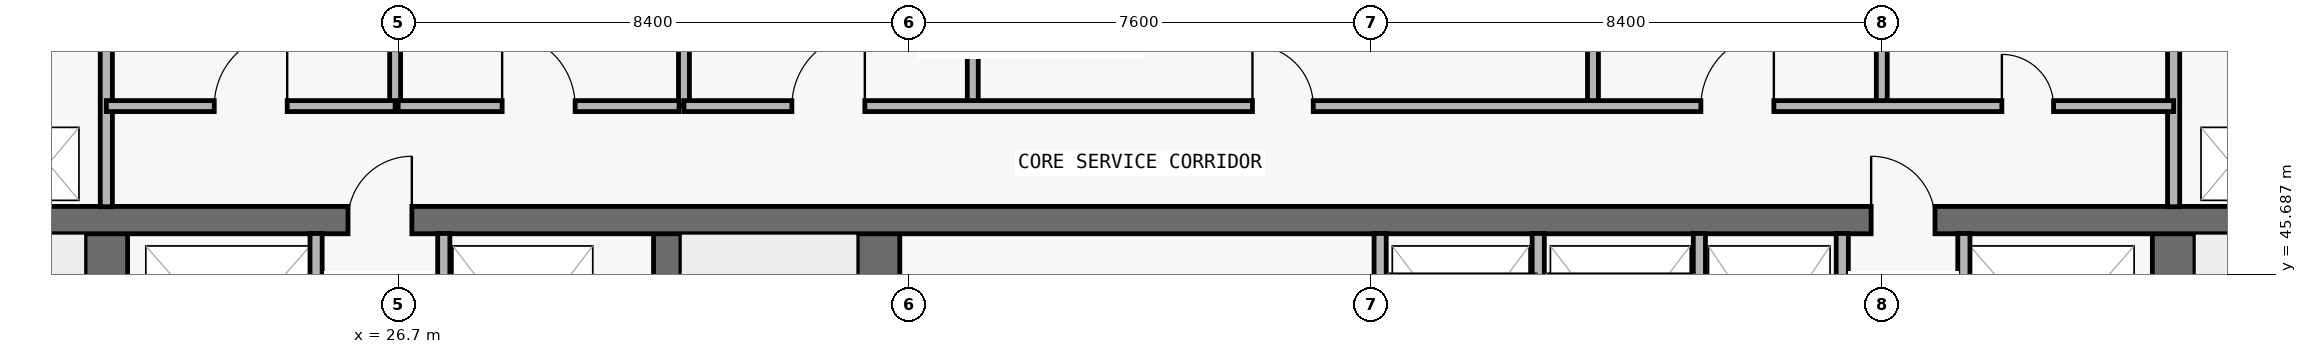
"""IFC4 building model, lengths in metres.
Left out: names, types, materials, properties, quantities, classifications, styles, units other than length and angle.
Written with IfcOpenShell. Run it as: python <this file> out.ifc"""

import sys

from ifc_helpers import new_model, si_unit, direction, frame, frame_2d, origin, place, context, subcontext, project, spatial, rectangle, extrude, element, fill, save


model = new_model("IFC4")
c1 = context("Model", 3, precision=1e-05, world=origin(), true_north=direction((0.0, 1.0)))
c2 = subcontext(c1, "Body", "Model", "MODEL_VIEW")
j1 = project(units=[si_unit("LENGTHUNIT", "METRE"), si_unit("PLANEANGLEUNIT", "RADIAN")], contexts=[c1])
p1 = place(None, origin())
s1 = spatial("IfcSite", under=j1, at=p1, CompositionType="ELEMENT")
p2 = place(p1, origin())
s2 = spatial("IfcBuilding", under=s1, at=p2, CompositionType="ELEMENT")
p3 = place(p2, frame((0.0, 0.0, 170.4)))
s3 = spatial("IfcBuildingStorey", under=s2, at=p3, CompositionType="ELEMENT", Elevation=170.4)
p4 = place(p3, frame((21.9, 37.0, 0.0), z_axis=(0.0, 0.0, 1.0), x_axis=(0.0, 1.0, 0.0)))
e1 = element("IfcWall", 1, at=p4, inside=s3, PredefinedType="SHEAR", context=c2, shape_type="SweptSolid", body=[
    extrude(rectangle(XDim=9.575, YDim=0.7, at=frame_2d((4.788, 0.0))), origin(), (0.0, 0.0, 1.0), 3.05),
])
p5 = place(p4, frame((0.55, 0.0, 0.0)))
e2 = element("IfcOpeningElement", 2, at=p5, cuts=e1, PredefinedType="OPENING", context=c2, shape_type="SweptSolid", body=[
    extrude(rectangle(XDim=1.1, YDim=2.15, at=frame_2d((0.55, 1.075))), frame((0.0, 0.36, 0.0), z_axis=(0.0, -1.0, 0.0), x_axis=(1.0, 0.0, 0.0)), (0.0, 0.0, 1.0), 0.72),
])
p6 = place(p3, frame((55.9, 37.0, 0.0), z_axis=(0.0, 0.0, 1.0), x_axis=(0.0, 1.0, 0.0)))
e3 = element("IfcWall", 3, at=p6, inside=s3, PredefinedType="SHEAR", context=c2, shape_type="SweptSolid", body=[
    extrude(rectangle(XDim=9.575, YDim=0.7, at=frame_2d((4.788, 0.0))), origin(), (0.0, 0.0, 1.0), 3.05),
])
p7 = place(p6, frame((0.55, 0.0, 0.0)))
e4 = element("IfcOpeningElement", 4, at=p7, cuts=e3, PredefinedType="OPENING", context=c2, shape_type="SweptSolid", body=[
    extrude(rectangle(XDim=1.1, YDim=2.15, at=frame_2d((0.55, 1.075))), frame((0.0, 0.36, 0.0), z_axis=(0.0, -1.0, 0.0), x_axis=(1.0, 0.0, 0.0)), (0.0, 0.0, 1.0), 0.72),
])
p8 = place(p3, frame((31.125, 37.0, 0.0), z_axis=(0.0, 0.0, 1.0), x_axis=(0.0, 1.0, 0.0)))
e5 = element("IfcWall", 5, at=p8, inside=s3, PredefinedType="SHEAR", context=c2, shape_type="SweptSolid", body=[
    extrude(rectangle(XDim=9.575, YDim=0.45, at=frame_2d((4.788, 0.0))), origin(), (0.0, 0.0, 1.0), 3.05),
])
p9 = place(p3, frame((34.6, 37.0, 0.0), z_axis=(0.0, 0.0, 1.0), x_axis=(0.0, 1.0, 0.0)))
e6 = element("IfcWall", 6, at=p9, inside=s3, PredefinedType="SHEAR", context=c2, shape_type="SweptSolid", body=[
    extrude(rectangle(XDim=9.575, YDim=0.7, at=frame_2d((4.788, 0.0))), origin(), (0.0, 0.0, 1.0), 3.05),
])
p10 = place(p3, frame((18.3, 46.575, 0.0), z_axis=(0.0, 0.0, 1.0), x_axis=(1.0, 0.0, 0.0)))
e7 = element("IfcWall", 7, at=p10, inside=s3, PredefinedType="SHEAR", context=c2, shape_type="SweptSolid", body=[
    extrude(rectangle(XDim=41.2, YDim=0.45, at=frame_2d((20.6, 0.0))), origin(), (0.0, 0.0, 1.0), 3.05),
])
p11 = place(p10, frame((7.575, 0.0, 0.0)))
e8 = element("IfcOpeningElement", 8, at=p11, cuts=e7, PredefinedType="OPENING", context=c2, shape_type="SweptSolid", body=[
    extrude(rectangle(XDim=1.05, YDim=2.15, at=frame_2d((0.525, 1.075))), frame((0.0, 0.235, 0.0), z_axis=(0.0, -1.0, 0.0), x_axis=(1.0, 0.0, 0.0)), (0.0, 0.0, 1.0), 0.47),
])
p12 = place(p10, frame((32.625, 0.0, 0.0)))
e9 = element("IfcOpeningElement", 9, at=p12, cuts=e7, PredefinedType="OPENING", context=c2, shape_type="SweptSolid", body=[
    extrude(rectangle(XDim=1.05, YDim=2.15, at=frame_2d((0.525, 1.075))), frame((0.0, 0.235, 0.0), z_axis=(0.0, -1.0, 0.0), x_axis=(1.0, 0.0, 0.0)), (0.0, 0.0, 1.0), 0.47),
])
p13 = place(p3, frame((21.9, 46.795, 0.0), z_axis=(0.0, 0.0, 1.0), x_axis=(0.0, 1.0, 0.0)))
e10 = element("IfcWall", 10, at=p13, inside=s3, PredefinedType="PARTITIONING", context=c2, shape_type="SweptSolid", body=[
    extrude(rectangle(XDim=3.16, YDim=0.2, at=frame_2d((1.58, 0.0))), origin(), (0.0, 0.0, 1.0), 3.05),
])
p14 = place(p3, frame((25.35, 43.17, 0.0), z_axis=(0.0, 0.0, 1.0), x_axis=(0.0, 1.0, 0.0)))
e11 = element("IfcWall", 11, at=p14, inside=s3, PredefinedType="PARTITIONING", context=c2, shape_type="SweptSolid", body=[
    extrude(rectangle(XDim=3.185, YDim=0.2, at=frame_2d((1.593, 0.0))), origin(), (0.0, 0.0, 1.0), 3.05),
])
p15 = place(p3, frame((26.65, 48.45, 0.0), z_axis=(0.0, 0.0, 1.0), x_axis=(0.0, 1.0, 0.0)))
e12 = element("IfcWall", 12, at=p15, inside=s3, PredefinedType="PARTITIONING", context=c2, shape_type="SweptSolid", body=[
    extrude(rectangle(XDim=1.505, YDim=0.18, at=frame_2d((0.752, 0.0))), origin(), (0.0, 0.0, 1.0), 3.05),
])
p16 = place(p3, frame((27.45, 43.17, 0.0), z_axis=(0.0, 0.0, 1.0), x_axis=(0.0, 1.0, 0.0)))
e13 = element("IfcWall", 13, at=p16, inside=s3, PredefinedType="PARTITIONING", context=c2, shape_type="SweptSolid", body=[
    extrude(rectangle(XDim=3.185, YDim=0.2, at=frame_2d((1.593, 0.0))), origin(), (0.0, 0.0, 1.0), 3.05),
])
for number, where, z_axis, x_axis in (
    (14, (31.4, 48.45, 0.0), (0.0, 0.0, 1.0), (0.0, 1.0, 0.0)),
    (15, (36.15, 48.45, 0.0), (0.0, 0.0, 1.0), (0.0, 1.0, 0.0)),
):
    element("IfcWall", number, at=place(p3, frame(where, z_axis=z_axis, x_axis=x_axis)), inside=s3, PredefinedType="PARTITIONING", context=c2, shape_type="SweptSolid", body=[
        extrude(rectangle(XDim=1.505, YDim=0.18, at=frame_2d((0.752, 0.0))), origin(), (0.0, 0.0, 1.0), 3.05),
    ])
for number, where, z_axis, x_axis in (
    (16, (42.85, 43.17, 0.0), (0.0, 0.0, 1.0), (0.0, 1.0, 0.0)),
    (17, (45.45, 43.17, 0.0), (0.0, 0.0, 1.0), (0.0, 1.0, 0.0)),
):
    element("IfcWall", number, at=place(p3, frame(where, z_axis=z_axis, x_axis=x_axis)), inside=s3, PredefinedType="PARTITIONING", context=c2, shape_type="SweptSolid", body=[
        extrude(rectangle(XDim=3.185, YDim=0.2, at=frame_2d((1.593, 0.0))), origin(), (0.0, 0.0, 1.0), 3.05),
    ])
p17 = place(p3, frame((46.35, 48.45, 0.0), z_axis=(0.0, 0.0, 1.0), x_axis=(0.0, 1.0, 0.0)))
e18 = element("IfcWall", 18, at=p17, inside=s3, PredefinedType="PARTITIONING", context=c2, shape_type="SweptSolid", body=[
    extrude(rectangle(XDim=1.505, YDim=0.18, at=frame_2d((0.752, 0.0))), origin(), (0.0, 0.0, 1.0), 3.05),
])
for number, where, z_axis, x_axis in (
    (19, (48.1, 43.17, 0.0), (0.0, 0.0, 1.0), (0.0, 1.0, 0.0)),
    (20, (50.45, 43.17, 0.0), (0.0, 0.0, 1.0), (0.0, 1.0, 0.0)),
):
    element("IfcWall", number, at=place(p3, frame(where, z_axis=z_axis, x_axis=x_axis)), inside=s3, PredefinedType="PARTITIONING", context=c2, shape_type="SweptSolid", body=[
        extrude(rectangle(XDim=3.185, YDim=0.2, at=frame_2d((1.593, 0.0))), origin(), (0.0, 0.0, 1.0), 3.05),
    ])
p18 = place(p3, frame((51.1, 48.45, 0.0), z_axis=(0.0, 0.0, 1.0), x_axis=(0.0, 1.0, 0.0)))
e21 = element("IfcWall", 21, at=p18, inside=s3, PredefinedType="PARTITIONING", context=c2, shape_type="SweptSolid", body=[
    extrude(rectangle(XDim=1.505, YDim=0.18, at=frame_2d((0.752, 0.0))), origin(), (0.0, 0.0, 1.0), 3.05),
])
p19 = place(p3, frame((52.45, 43.17, 0.0), z_axis=(0.0, 0.0, 1.0), x_axis=(0.0, 1.0, 0.0)))
e22 = element("IfcWall", 22, at=p19, inside=s3, PredefinedType="PARTITIONING", context=c2, shape_type="SweptSolid", body=[
    extrude(rectangle(XDim=3.185, YDim=0.2, at=frame_2d((1.593, 0.0))), origin(), (0.0, 0.0, 1.0), 3.05),
])
p20 = place(p3, frame((55.9, 46.795, 0.0), z_axis=(0.0, 0.0, 1.0), x_axis=(0.0, 1.0, 0.0)))
e23 = element("IfcWall", 23, at=p20, inside=s3, PredefinedType="PARTITIONING", context=c2, shape_type="SweptSolid", body=[
    extrude(rectangle(XDim=3.16, YDim=0.2, at=frame_2d((1.58, 0.0))), origin(), (0.0, 0.0, 1.0), 3.05),
])
p21 = place(p3, frame((21.9, 48.45, 0.0), z_axis=(0.0, 0.0, 1.0), x_axis=(1.0, 0.0, 0.0)))
e24 = element("IfcWall", 24, at=p21, inside=s3, PredefinedType="PARTITIONING", context=c2, shape_type="SweptSolid", body=[
    extrude(rectangle(XDim=4.75, YDim=0.18, at=frame_2d((2.375, 0.0))), origin(), (0.0, 0.0, 1.0), 3.05),
])
p22 = place(p21, frame((1.775, 0.0, 0.0)))
e25 = element("IfcOpeningElement", 25, at=p22, cuts=e24, PredefinedType="OPENING", context=c2, shape_type="SweptSolid", body=[
    extrude(rectangle(XDim=1.2, YDim=2.2, at=frame_2d((0.6, 1.1))), frame((0.0, 0.1, 0.0), z_axis=(0.0, -1.0, 0.0), x_axis=(1.0, 0.0, 0.0)), (0.0, 0.0, 1.0), 0.2),
])
p23 = place(p3, frame((26.7, 48.45, 0.0), z_axis=(0.0, 0.0, 1.0), x_axis=(1.0, 0.0, 0.0)))
e26 = element("IfcWall", 26, at=p23, inside=s3, PredefinedType="PARTITIONING", context=c2, shape_type="SweptSolid", body=[
    extrude(rectangle(XDim=4.62, YDim=0.18, at=frame_2d((2.31, 0.0))), origin(), (0.0, 0.0, 1.0), 3.05),
])
p24 = place(p23, frame((1.71, 0.0, 0.0)))
e27 = element("IfcOpeningElement", 27, at=p24, cuts=e26, PredefinedType="OPENING", context=c2, shape_type="SweptSolid", body=[
    extrude(rectangle(XDim=1.2, YDim=2.2, at=frame_2d((0.6, 1.1))), frame((0.0, 0.1, 0.0), z_axis=(0.0, -1.0, 0.0), x_axis=(1.0, 0.0, 0.0)), (0.0, 0.0, 1.0), 0.2),
])
p25 = place(p3, frame((31.4, 48.45, 0.0), z_axis=(0.0, 0.0, 1.0), x_axis=(1.0, 0.0, 0.0)))
e28 = element("IfcWall", 28, at=p25, inside=s3, PredefinedType="PARTITIONING", context=c2, shape_type="SweptSolid", body=[
    extrude(rectangle(XDim=24.5, YDim=0.18, at=frame_2d((12.25, 0.0))), origin(), (0.0, 0.0, 1.0), 3.05),
])
p26 = place(p25, frame((1.775, 0.0, 0.0)))
e29 = element("IfcOpeningElement", 29, at=p26, cuts=e28, PredefinedType="OPENING", context=c2, shape_type="SweptSolid", body=[
    extrude(rectangle(XDim=1.2, YDim=2.2, at=frame_2d((0.6, 1.1))), frame((0.0, 0.1, 0.0), z_axis=(0.0, -1.0, 0.0), x_axis=(1.0, 0.0, 0.0)), (0.0, 0.0, 1.0), 0.2),
])
p27 = place(p25, frame((9.35, 0.0, 0.0)))
e30 = element("IfcOpeningElement", 30, at=p27, cuts=e28, PredefinedType="OPENING", context=c2, shape_type="SweptSolid", body=[
    extrude(rectangle(XDim=1.0, YDim=2.2, at=frame_2d((0.5, 1.1))), frame((0.0, 0.1, 0.0), z_axis=(0.0, -1.0, 0.0), x_axis=(1.0, 0.0, 0.0)), (0.0, 0.0, 1.0), 0.2),
])
p28 = place(p25, frame((16.725, 0.0, 0.0)))
e31 = element("IfcOpeningElement", 31, at=p28, cuts=e28, PredefinedType="OPENING", context=c2, shape_type="SweptSolid", body=[
    extrude(rectangle(XDim=1.2, YDim=2.2, at=frame_2d((0.6, 1.1))), frame((0.0, 0.1, 0.0), z_axis=(0.0, -1.0, 0.0), x_axis=(1.0, 0.0, 0.0)), (0.0, 0.0, 1.0), 0.2),
])
p29 = place(p25, frame((21.675, 0.0, 0.0)))
e32 = element("IfcOpeningElement", 32, at=p29, cuts=e28, PredefinedType="OPENING", context=c2, shape_type="SweptSolid", body=[
    extrude(rectangle(XDim=0.85, YDim=2.1, at=frame_2d((0.425, 1.05))), frame((0.0, 0.1, 0.0), z_axis=(0.0, -1.0, 0.0), x_axis=(1.0, 0.0, 0.0)), (0.0, 0.0, 1.0), 0.2),
])
p30 = place(p11, origin())
e33 = element("IfcDoor", 33, at=p30, inside=s3, OperationType="SINGLE_SWING_RIGHT", PredefinedType="DOOR", context=c2, shape_type="SweptSolid", body=[
    extrude(rectangle(XDim=1.05, YDim=2.15, at=frame_2d((0.525, 1.075))), frame((0.0, 0.025, 0.0), z_axis=(0.0, -1.0, 0.0), x_axis=(1.0, 0.0, 0.0)), (0.0, 0.0, 1.0), 0.05),
])
fill(e8, e33)
p31 = place(p12, origin())
e34 = element("IfcDoor", 34, at=p31, inside=s3, OperationType="SINGLE_SWING_LEFT", PredefinedType="DOOR", context=c2, shape_type="SweptSolid", body=[
    extrude(rectangle(XDim=1.05, YDim=2.15, at=frame_2d((0.525, 1.075))), frame((0.0, 0.025, 0.0), z_axis=(0.0, -1.0, 0.0), x_axis=(1.0, 0.0, 0.0)), (0.0, 0.0, 1.0), 0.05),
])
fill(e9, e34)
p32 = place(p22, origin())
e35 = element("IfcDoor", 35, at=p32, inside=s3, OperationType="SINGLE_SWING_RIGHT", PredefinedType="DOOR", context=c2, shape_type="SweptSolid", body=[
    extrude(rectangle(XDim=1.2, YDim=2.2, at=frame_2d((0.6, 1.1))), frame((0.0, 0.025, 0.0), z_axis=(0.0, -1.0, 0.0), x_axis=(1.0, 0.0, 0.0)), (0.0, 0.0, 1.0), 0.05),
])
fill(e25, e35)
p33 = place(p24, origin())
e36 = element("IfcDoor", 36, at=p33, inside=s3, OperationType="SINGLE_SWING_LEFT", PredefinedType="DOOR", context=c2, shape_type="SweptSolid", body=[
    extrude(rectangle(XDim=1.2, YDim=2.2, at=frame_2d((0.6, 1.1))), frame((0.0, 0.025, 0.0), z_axis=(0.0, -1.0, 0.0), x_axis=(1.0, 0.0, 0.0)), (0.0, 0.0, 1.0), 0.05),
])
fill(e27, e36)
p34 = place(p26, origin())
e37 = element("IfcDoor", 37, at=p34, inside=s3, OperationType="SINGLE_SWING_RIGHT", PredefinedType="DOOR", context=c2, shape_type="SweptSolid", body=[
    extrude(rectangle(XDim=1.2, YDim=2.2, at=frame_2d((0.6, 1.1))), frame((0.0, 0.025, 0.0), z_axis=(0.0, -1.0, 0.0), x_axis=(1.0, 0.0, 0.0)), (0.0, 0.0, 1.0), 0.05),
])
fill(e29, e37)
p35 = place(p27, origin())
e38 = element("IfcDoor", 38, at=p35, inside=s3, OperationType="SINGLE_SWING_LEFT", PredefinedType="DOOR", context=c2, shape_type="SweptSolid", body=[
    extrude(rectangle(XDim=1.0, YDim=2.2, at=frame_2d((0.5, 1.1))), frame((0.0, 0.025, 0.0), z_axis=(0.0, -1.0, 0.0), x_axis=(1.0, 0.0, 0.0)), (0.0, 0.0, 1.0), 0.05),
])
fill(e30, e38)
p36 = place(p28, origin())
e39 = element("IfcDoor", 39, at=p36, inside=s3, OperationType="SINGLE_SWING_RIGHT", PredefinedType="DOOR", context=c2, shape_type="SweptSolid", body=[
    extrude(rectangle(XDim=1.2, YDim=2.2, at=frame_2d((0.6, 1.1))), frame((0.0, 0.025, 0.0), z_axis=(0.0, -1.0, 0.0), x_axis=(1.0, 0.0, 0.0)), (0.0, 0.0, 1.0), 0.05),
])
fill(e31, e39)
p37 = place(p29, origin())
e40 = element("IfcDoor", 40, at=p37, inside=s3, OperationType="SINGLE_SWING_LEFT", PredefinedType="DOOR", context=c2, shape_type="SweptSolid", body=[
    extrude(rectangle(XDim=0.85, YDim=2.1, at=frame_2d((0.425, 1.05))), frame((0.0, 0.025, 0.0), z_axis=(0.0, -1.0, 0.0), x_axis=(1.0, 0.0, 0.0)), (0.0, 0.0, 1.0), 0.05),
])
fill(e32, e40)
save(model, sys.argv[1])
